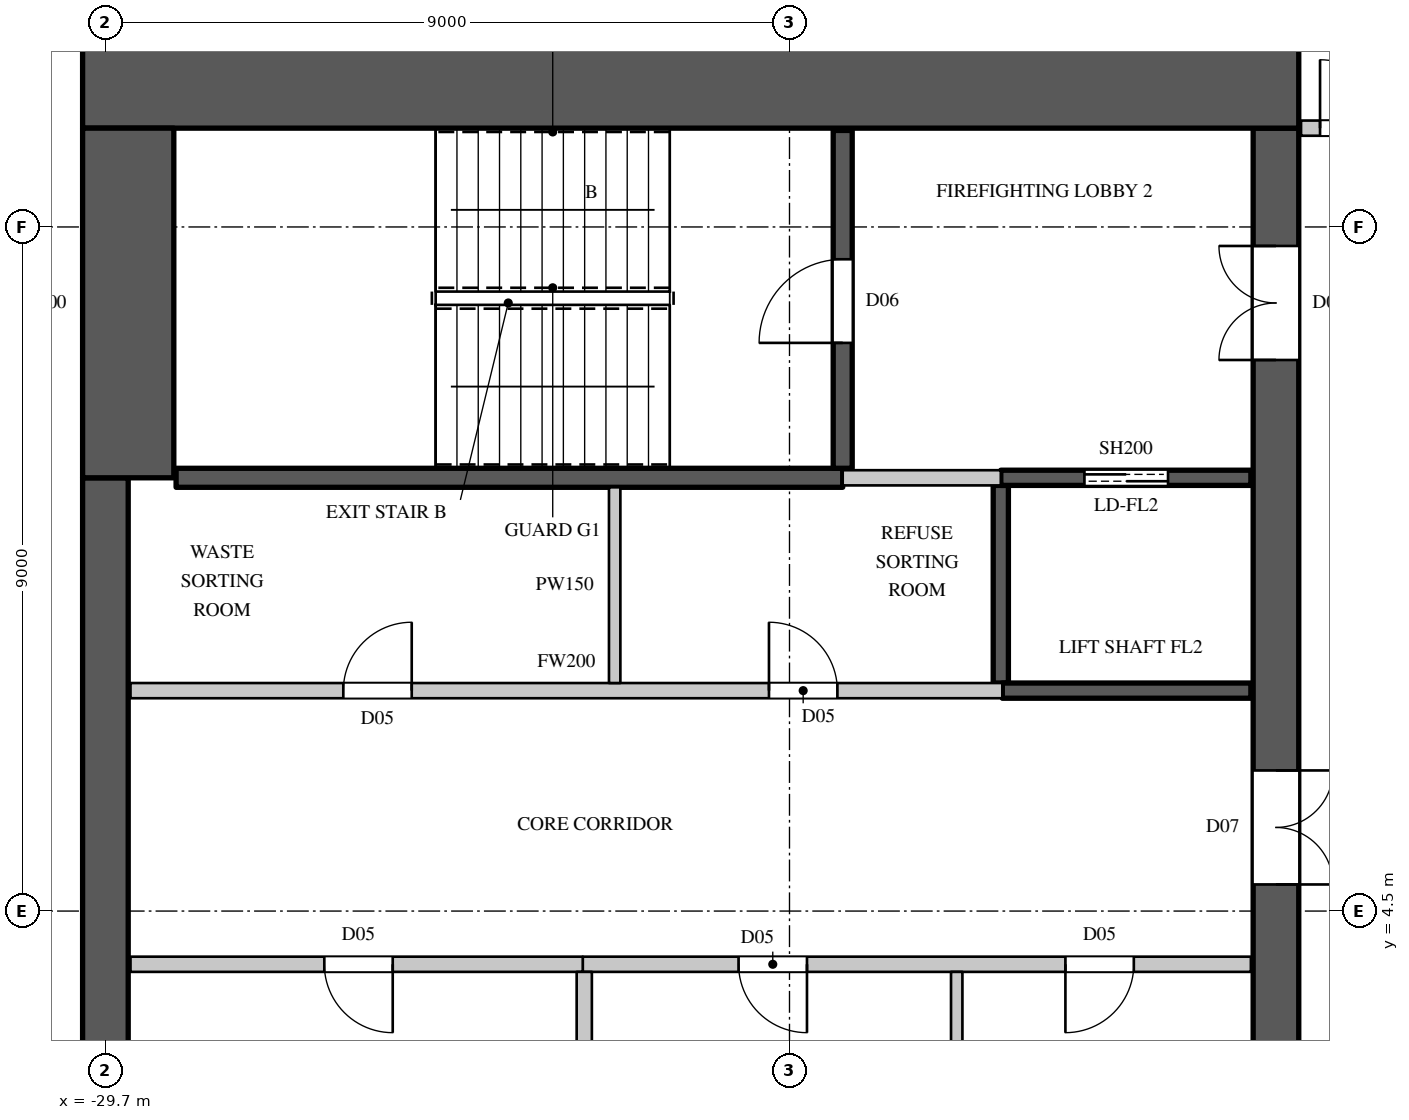
"""IFC4 building model, lengths in metres.
Left out: names, types, materials, properties, quantities, classifications, styles, units other than length and angle.
Written with IfcOpenShell. Run it as: python <this file> out.ifc"""

import sys

from ifc_helpers import new_model, si_unit, direction, frame, frame_2d, origin, place, context, subcontext, project, spatial, rectangle, extrude, element, fill, save


model = new_model("IFC4")
c1 = context("Model", 3, precision=1e-05, world=origin(), true_north=direction((0.0, 1.0)))
c2 = subcontext(c1, "Body", "Model", "MODEL_VIEW")
j1 = project(units=[si_unit("LENGTHUNIT", "METRE"), si_unit("PLANEANGLEUNIT", "RADIAN")], contexts=[c1])
p1 = place(None, origin())
s1 = spatial("IfcSite", under=j1, at=p1, CompositionType="ELEMENT")
p2 = place(p1, origin())
s2 = spatial("IfcBuilding", under=s1, at=p2, CompositionType="ELEMENT")
p3 = place(p2, frame((0.0, 0.0, 351.0)))
s3 = spatial("IfcBuildingStorey", under=s2, at=p3, CompositionType="ELEMENT", Elevation=351.0)
p4 = place(p3, frame((-30.0, 15.4, 0.0), z_axis=(0.0, 0.0, 1.0), x_axis=(1.0, 0.0, 0.0)))
e1 = element("IfcWall", 1, at=p4, inside=s3, PredefinedType="SHEAR", context=c2, shape_type="SweptSolid", body=[
    extrude(rectangle(XDim=16.0, YDim=1.2, at=frame_2d((8.0, 0.0))), origin(), (0.0, 0.0, 1.0), 4.0),
])
p5 = place(p3, frame((-14.3, -14.8, 0.0), z_axis=(0.0, 0.0, 1.0), x_axis=(0.0, 1.0, 0.0)))
e2 = element("IfcWall", 2, at=p5, inside=s3, PredefinedType="SHEAR", context=c2, shape_type="SweptSolid", body=[
    extrude(rectangle(XDim=29.6, YDim=0.6, at=frame_2d((14.8, 0.0))), origin(), (0.0, 0.0, 1.0), 4.0),
])
p6 = place(p5, frame((1.55, 0.0, 0.0)))
e3 = element("IfcOpeningElement", 3, at=p6, cuts=e2, PredefinedType="OPENING", context=c2, shape_type="SweptSolid", body=[
    extrude(rectangle(XDim=1.5, YDim=2.4, at=frame_2d((0.75, 1.2))), frame((0.0, 0.31, 0.0), z_axis=(0.0, -1.0, 0.0), x_axis=(1.0, 0.0, 0.0)), (0.0, 0.0, 1.0), 0.62),
])
p7 = place(p5, frame((26.55, 0.0, 0.0)))
e4 = element("IfcOpeningElement", 4, at=p7, cuts=e2, PredefinedType="OPENING", context=c2, shape_type="SweptSolid", body=[
    extrude(rectangle(XDim=1.5, YDim=2.4, at=frame_2d((0.75, 1.2))), frame((0.0, 0.31, 0.0), z_axis=(0.0, -1.0, 0.0), x_axis=(1.0, 0.0, 0.0)), (0.0, 0.0, 1.0), 0.62),
])
p8 = place(p5, frame((8.45, 0.0, 0.0)))
e5 = element("IfcOpeningElement", 5, at=p8, cuts=e2, PredefinedType="OPENING", context=c2, shape_type="SweptSolid", body=[
    extrude(rectangle(XDim=1.5, YDim=2.4, at=frame_2d((0.75, 1.2))), frame((0.0, 0.31, 0.0), z_axis=(0.0, -1.0, 0.0), x_axis=(1.0, 0.0, 0.0)), (0.0, 0.0, 1.0), 0.62),
])
p9 = place(p5, frame((19.65, 0.0, 0.0)))
e6 = element("IfcOpeningElement", 6, at=p9, cuts=e2, PredefinedType="OPENING", context=c2, shape_type="SweptSolid", body=[
    extrude(rectangle(XDim=1.5, YDim=2.4, at=frame_2d((0.75, 1.2))), frame((0.0, 0.31, 0.0), z_axis=(0.0, -1.0, 0.0), x_axis=(1.0, 0.0, 0.0)), (0.0, 0.0, 1.0), 0.62),
])
p10 = place(p5, frame((14.5, 0.0, 0.0)))
e7 = element("IfcOpeningElement", 7, at=p10, cuts=e2, PredefinedType="OPENING", context=c2, shape_type="SweptSolid", body=[
    extrude(rectangle(XDim=0.6, YDim=2.0, at=frame_2d((0.3, 1.0))), frame((0.0, 0.31, 0.0), z_axis=(0.0, -1.0, 0.0), x_axis=(1.0, 0.0, 0.0)), (0.0, 0.0, 1.0), 0.62),
])
p11 = place(p3, frame((-29.7, -10.2, 0.0), z_axis=(0.0, 0.0, 1.0), x_axis=(0.0, 1.0, 0.0)))
e8 = element("IfcWall", 8, at=p11, inside=s3, PredefinedType="SHEAR", context=c2, shape_type="SweptSolid", body=[
    extrude(rectangle(XDim=20.4, YDim=0.6, at=frame_2d((10.2, 0.0))), origin(), (0.0, 0.0, 1.0), 4.0),
])
p12 = place(p3, frame((-29.4, 10.2, 0.0), z_axis=(0.0, 0.0, 1.0), x_axis=(0.0, 1.0, 0.0)))
e9 = element("IfcWall", 9, at=p12, inside=s3, PredefinedType="SHEAR", context=c2, shape_type="SweptSolid", body=[
    extrude(rectangle(XDim=4.6, YDim=1.2, at=frame_2d((2.3, 0.0))), origin(), (0.0, 0.0, 1.0), 4.0),
])
p13 = place(p3, frame((-29.37, 7.4, 0.0), z_axis=(0.0, 0.0, 1.0), x_axis=(1.0, 0.0, 0.0)))
e10 = element("IfcWall", 10, at=p13, inside=s3, PredefinedType="PARTITIONING", context=c2, shape_type="SweptSolid", body=[
    extrude(rectangle(XDim=11.47, YDim=0.2, at=frame_2d((5.735, 0.0))), origin(), (0.0, 0.0, 1.0), 3.598),
])
p14 = place(p13, frame((2.8, 0.0, 0.0)))
e11 = element("IfcOpeningElement", 11, at=p14, cuts=e10, PredefinedType="OPENING", context=c2, shape_type="SweptSolid", body=[
    extrude(rectangle(XDim=0.9, YDim=2.2, at=frame_2d((0.45, 1.1))), frame((0.0, 0.11, 0.0), z_axis=(0.0, -1.0, 0.0), x_axis=(1.0, 0.0, 0.0)), (0.0, 0.0, 1.0), 0.22),
])
p15 = place(p13, frame((8.4, 0.0, 0.0)))
e12 = element("IfcOpeningElement", 12, at=p15, cuts=e10, PredefinedType="OPENING", context=c2, shape_type="SweptSolid", body=[
    extrude(rectangle(XDim=0.9, YDim=2.2, at=frame_2d((0.45, 1.1))), frame((0.0, 0.11, 0.0), z_axis=(0.0, -1.0, 0.0), x_axis=(1.0, 0.0, 0.0)), (0.0, 0.0, 1.0), 0.22),
])
p16 = place(p3, frame((-23.42, 3.8, 0.0), z_axis=(0.0, 0.0, 1.0), x_axis=(1.0, 0.0, 0.0)))
e13 = element("IfcWall", 13, at=p16, inside=s3, PredefinedType="PARTITIONING", context=c2, shape_type="SweptSolid", body=[
    extrude(rectangle(XDim=8.79, YDim=0.2, at=frame_2d((4.395, 0.0))), origin(), (0.0, 0.0, 1.0), 3.598),
])
p17 = place(p16, frame((2.05, 0.0, 0.0)))
e14 = element("IfcOpeningElement", 14, at=p17, cuts=e13, PredefinedType="OPENING", context=c2, shape_type="SweptSolid", body=[
    extrude(rectangle(XDim=0.9, YDim=2.2, at=frame_2d((0.45, 1.1))), frame((0.0, 0.11, 0.0), z_axis=(0.0, -1.0, 0.0), x_axis=(1.0, 0.0, 0.0)), (0.0, 0.0, 1.0), 0.22),
])
p18 = place(p16, frame((6.35, 0.0, 0.0)))
e15 = element("IfcOpeningElement", 15, at=p18, cuts=e13, PredefinedType="OPENING", context=c2, shape_type="SweptSolid", body=[
    extrude(rectangle(XDim=0.9, YDim=2.2, at=frame_2d((0.45, 1.1))), frame((0.0, 0.11, 0.0), z_axis=(0.0, -1.0, 0.0), x_axis=(1.0, 0.0, 0.0)), (0.0, 0.0, 1.0), 0.22),
])
p19 = place(p3, frame((-20.0, 10.2, 0.0), z_axis=(0.0, 0.0, 1.0), x_axis=(1.0, 0.0, 0.0)))
e16 = element("IfcWall", 16, at=p19, inside=s3, PredefinedType="PARTITIONING", context=c2, shape_type="SweptSolid", body=[
    extrude(rectangle(XDim=2.08, YDim=0.2, at=frame_2d((1.04, 0.0))), origin(), (0.0, 0.0, 1.0), 3.598),
])
p20 = place(p3, frame((-23.0, 7.5, 0.0), z_axis=(0.0, 0.0, 1.0), x_axis=(0.0, 1.0, 0.0)))
e17 = element("IfcWall", 17, at=p20, inside=s3, PredefinedType="PARTITIONING", context=c2, shape_type="SweptSolid", body=[
    extrude(rectangle(XDim=2.575, YDim=0.15, at=frame_2d((1.288, 0.0))), origin(), (0.0, 0.0, 1.0), 3.598),
])
p21 = place(p3, frame((-18.5, 1.1, 0.0), z_axis=(0.0, 0.0, 1.0), x_axis=(0.0, 1.0, 0.0)))
e18 = element("IfcWall", 18, at=p21, inside=s3, PredefinedType="PARTITIONING", context=c2, shape_type="SweptSolid", body=[
    extrude(rectangle(XDim=2.6, YDim=0.15, at=frame_2d((1.3, 0.0))), origin(), (0.0, 0.0, 1.0), 3.598),
])
p22 = place(p3, frame((-29.37, 3.8, 0.0), z_axis=(0.0, 0.0, 1.0), x_axis=(1.0, 0.0, 0.0)))
e19 = element("IfcWall", 19, at=p22, inside=s3, PredefinedType="PARTITIONING", context=c2, shape_type="SweptSolid", body=[
    extrude(rectangle(XDim=5.95, YDim=0.2, at=frame_2d((2.975, 0.0))), origin(), (0.0, 0.0, 1.0), 3.598),
])
p23 = place(p22, frame((2.55, 0.0, 0.0)))
e20 = element("IfcOpeningElement", 20, at=p23, cuts=e19, PredefinedType="OPENING", context=c2, shape_type="SweptSolid", body=[
    extrude(rectangle(XDim=0.9, YDim=2.2, at=frame_2d((0.45, 1.1))), frame((0.0, 0.11, 0.0), z_axis=(0.0, -1.0, 0.0), x_axis=(1.0, 0.0, 0.0)), (0.0, 0.0, 1.0), 0.22),
])
p24 = place(p3, frame((-23.4, 1.1, 0.0), z_axis=(0.0, 0.0, 1.0), x_axis=(0.0, 1.0, 0.0)))
e21 = element("IfcWall", 21, at=p24, inside=s3, PredefinedType="PARTITIONING", context=c2, shape_type="SweptSolid", body=[
    extrude(rectangle(XDim=2.6, YDim=0.2, at=frame_2d((1.3, 0.0))), origin(), (0.0, 0.0, 1.0), 3.598),
])
p25 = place(p3, frame((-13.97, 14.8, 0.0), z_axis=(0.0, 0.0, 1.0), x_axis=(1.0, 0.0, 0.0)))
e22 = element("IfcWall", 22, at=p25, inside=s3, PredefinedType="PARTITIONING", context=c2, shape_type="SweptSolid", body=[
    extrude(rectangle(XDim=2.27, YDim=0.2, at=frame_2d((1.135, 0.0))), origin(), (0.0, 0.0, 1.0), 3.598),
])
p26 = place(p25, frame((0.25, 0.0, 0.0)))
e23 = element("IfcOpeningElement", 23, at=p26, cuts=e22, PredefinedType="OPENING", context=c2, shape_type="SweptSolid", body=[
    extrude(rectangle(XDim=1.8, YDim=2.4, at=frame_2d((0.9, 1.2))), frame((0.0, 0.11, 0.0), z_axis=(0.0, -1.0, 0.0), x_axis=(1.0, 0.0, 0.0)), (0.0, 0.0, 1.0), 0.22),
])
p27 = place(p3, frame((-17.92, 7.5, 0.0), z_axis=(0.0, 0.0, 1.0), x_axis=(0.0, 1.0, 0.0)))
e24 = element("IfcWall", 24, at=p27, inside=s3, PredefinedType="SHEAR", context=c2, shape_type="SweptSolid", body=[
    extrude(rectangle(XDim=2.6, YDim=0.2, at=frame_2d((1.3, 0.0))), origin(), (0.0, 0.0, 1.0), 3.598),
])
p28 = place(p3, frame((-17.9, 7.4, 0.0), z_axis=(0.0, 0.0, 1.0), x_axis=(1.0, 0.0, 0.0)))
e25 = element("IfcWall", 25, at=p28, inside=s3, PredefinedType="SHEAR", context=c2, shape_type="SweptSolid", body=[
    extrude(rectangle(XDim=3.27, YDim=0.2, at=frame_2d((1.635, 0.0))), origin(), (0.0, 0.0, 1.0), 3.598),
])
p29 = place(p3, frame((-17.92, 10.2, 0.0), z_axis=(0.0, 0.0, 1.0), x_axis=(1.0, 0.0, 0.0)))
e26 = element("IfcWall", 26, at=p29, inside=s3, PredefinedType="SHEAR", context=c2, shape_type="SweptSolid", body=[
    extrude(rectangle(XDim=3.29, YDim=0.2, at=frame_2d((1.645, 0.0))), origin(), (0.0, 0.0, 1.0), 3.598),
])
p30 = place(p29, frame((1.1, 0.0, 0.0)))
e27 = element("IfcOpeningElement", 27, at=p30, cuts=e26, PredefinedType="OPENING", context=c2, shape_type="SweptSolid", body=[
    extrude(rectangle(XDim=1.1, YDim=2.2, at=frame_2d((0.55, 1.1))), frame((0.0, 0.11, 0.0), z_axis=(0.0, -1.0, 0.0), x_axis=(1.0, 0.0, 0.0)), (0.0, 0.0, 1.0), 0.22),
])
p31 = place(p3, frame((-28.77, 10.2, 0.0), z_axis=(0.0, 0.0, 1.0), x_axis=(1.0, 0.0, 0.0)))
e28 = element("IfcWall", 28, at=p31, inside=s3, PredefinedType="SHEAR", context=c2, shape_type="SweptSolid", body=[
    extrude(rectangle(XDim=8.77, YDim=0.25, at=frame_2d((4.385, 0.0))), origin(), (0.0, 0.0, 1.0), 3.598),
])
p32 = place(p3, frame((-20.0, 10.325, 0.0), z_axis=(0.0, 0.0, 1.0), x_axis=(0.0, 1.0, 0.0)))
e29 = element("IfcWall", 29, at=p32, inside=s3, PredefinedType="SHEAR", context=c2, shape_type="SweptSolid", body=[
    extrude(rectangle(XDim=4.445, YDim=0.25, at=frame_2d((2.223, 0.0))), origin(), (0.0, 0.0, 1.0), 3.598),
])
p33 = place(p32, frame((1.65, 0.0, 0.0)))
e30 = element("IfcOpeningElement", 30, at=p33, cuts=e29, PredefinedType="OPENING", context=c2, shape_type="SweptSolid", body=[
    extrude(rectangle(XDim=1.1, YDim=2.2, at=frame_2d((0.55, 1.1))), frame((0.0, 0.135, 0.0), z_axis=(0.0, -1.0, 0.0), x_axis=(1.0, 0.0, 0.0)), (0.0, 0.0, 1.0), 0.27),
])
p34 = place(p33, origin())
e31 = element("IfcDoor", 31, at=p34, inside=s3, OperationType="SINGLE_SWING_LEFT", PredefinedType="DOOR", context=c2, shape_type="SweptSolid", body=[
    extrude(rectangle(XDim=1.1, YDim=2.2, at=frame_2d((0.55, 1.1))), frame((0.0, 0.025, 0.0), z_axis=(0.0, -1.0, 0.0), x_axis=(1.0, 0.0, 0.0)), (0.0, 0.0, 1.0), 0.05),
])
fill(e30, e31)
p35 = place(p23, origin())
e32 = element("IfcDoor", 32, at=p35, inside=s3, OperationType="SINGLE_SWING_LEFT", PredefinedType="DOOR", context=c2, shape_type="SweptSolid", body=[
    extrude(rectangle(XDim=0.9, YDim=2.2, at=frame_2d((0.45, 1.1))), frame((0.0, 0.025, 0.0), z_axis=(0.0, -1.0, 0.0), x_axis=(1.0, 0.0, 0.0)), (0.0, 0.0, 1.0), 0.05),
])
fill(e20, e32)
p36 = place(p17, origin())
e33 = element("IfcDoor", 33, at=p36, inside=s3, OperationType="SINGLE_SWING_LEFT", PredefinedType="DOOR", context=c2, shape_type="SweptSolid", body=[
    extrude(rectangle(XDim=0.9, YDim=2.2, at=frame_2d((0.45, 1.1))), frame((0.0, 0.025, 0.0), z_axis=(0.0, -1.0, 0.0), x_axis=(1.0, 0.0, 0.0)), (0.0, 0.0, 1.0), 0.05),
])
fill(e14, e33)
p37 = place(p18, origin())
e34 = element("IfcDoor", 34, at=p37, inside=s3, OperationType="SINGLE_SWING_RIGHT", PredefinedType="DOOR", context=c2, shape_type="SweptSolid", body=[
    extrude(rectangle(XDim=0.9, YDim=2.2, at=frame_2d((0.45, 1.1))), frame((0.0, 0.025, 0.0), z_axis=(0.0, -1.0, 0.0), x_axis=(1.0, 0.0, 0.0)), (0.0, 0.0, 1.0), 0.05),
])
fill(e15, e34)
p38 = place(p14, origin())
e35 = element("IfcDoor", 35, at=p38, inside=s3, OperationType="SINGLE_SWING_RIGHT", PredefinedType="DOOR", context=c2, shape_type="SweptSolid", body=[
    extrude(rectangle(XDim=0.9, YDim=2.2, at=frame_2d((0.45, 1.1))), frame((0.0, 0.025, 0.0), z_axis=(0.0, -1.0, 0.0), x_axis=(1.0, 0.0, 0.0)), (0.0, 0.0, 1.0), 0.05),
])
fill(e11, e35)
p39 = place(p15, origin())
e36 = element("IfcDoor", 36, at=p39, inside=s3, OperationType="SINGLE_SWING_LEFT", PredefinedType="DOOR", context=c2, shape_type="SweptSolid", body=[
    extrude(rectangle(XDim=0.9, YDim=2.2, at=frame_2d((0.45, 1.1))), frame((0.0, 0.025, 0.0), z_axis=(0.0, -1.0, 0.0), x_axis=(1.0, 0.0, 0.0)), (0.0, 0.0, 1.0), 0.05),
])
fill(e12, e36)
p40 = place(p30, origin())
e37 = element("IfcDoor", 37, at=p40, inside=s3, OperationType="DOUBLE_DOOR_SLIDING", PredefinedType="DOOR", context=c2, shape_type="SweptSolid", body=[
    extrude(rectangle(XDim=1.1, YDim=2.2, at=frame_2d((0.55, 1.1))), frame((0.0, 0.025, 0.0), z_axis=(0.0, -1.0, 0.0), x_axis=(1.0, 0.0, 0.0)), (0.0, 0.0, 1.0), 0.05),
])
fill(e27, e37)
p41 = place(p26, origin())
e38 = element("IfcDoor", 38, at=p41, inside=s3, OperationType="DOUBLE_DOOR_SINGLE_SWING", PredefinedType="DOOR", context=c2, shape_type="SweptSolid", body=[
    extrude(rectangle(XDim=1.8, YDim=2.4, at=frame_2d((0.9, 1.2))), frame((0.0, 0.025, 0.0), z_axis=(0.0, -1.0, 0.0), x_axis=(1.0, 0.0, 0.0)), (0.0, 0.0, 1.0), 0.05),
])
fill(e23, e38)
p42 = place(p7, origin())
e39 = element("IfcDoor", 39, at=p42, inside=s3, OperationType="DOUBLE_DOOR_SINGLE_SWING", PredefinedType="DOOR", context=c2, shape_type="SweptSolid", body=[
    extrude(rectangle(XDim=1.5, YDim=2.4, at=frame_2d((0.75, 1.2))), frame((0.0, 0.295, 0.0), z_axis=(0.0, -1.0, 0.0), x_axis=(1.0, 0.0, 0.0)), (0.0, 0.0, 1.0), 0.05),
])
fill(e4, e39)
p43 = place(p9, origin())
e40 = element("IfcDoor", 40, at=p43, inside=s3, OperationType="DOUBLE_DOOR_SINGLE_SWING", PredefinedType="DOOR", context=c2, shape_type="SweptSolid", body=[
    extrude(rectangle(XDim=1.5, YDim=2.4, at=frame_2d((0.75, 1.2))), frame((0.0, -0.245, 0.0), z_axis=(0.0, -1.0, 0.0), x_axis=(1.0, 0.0, 0.0)), (0.0, 0.0, 1.0), 0.05),
])
fill(e6, e40)
save(model, sys.argv[1])
